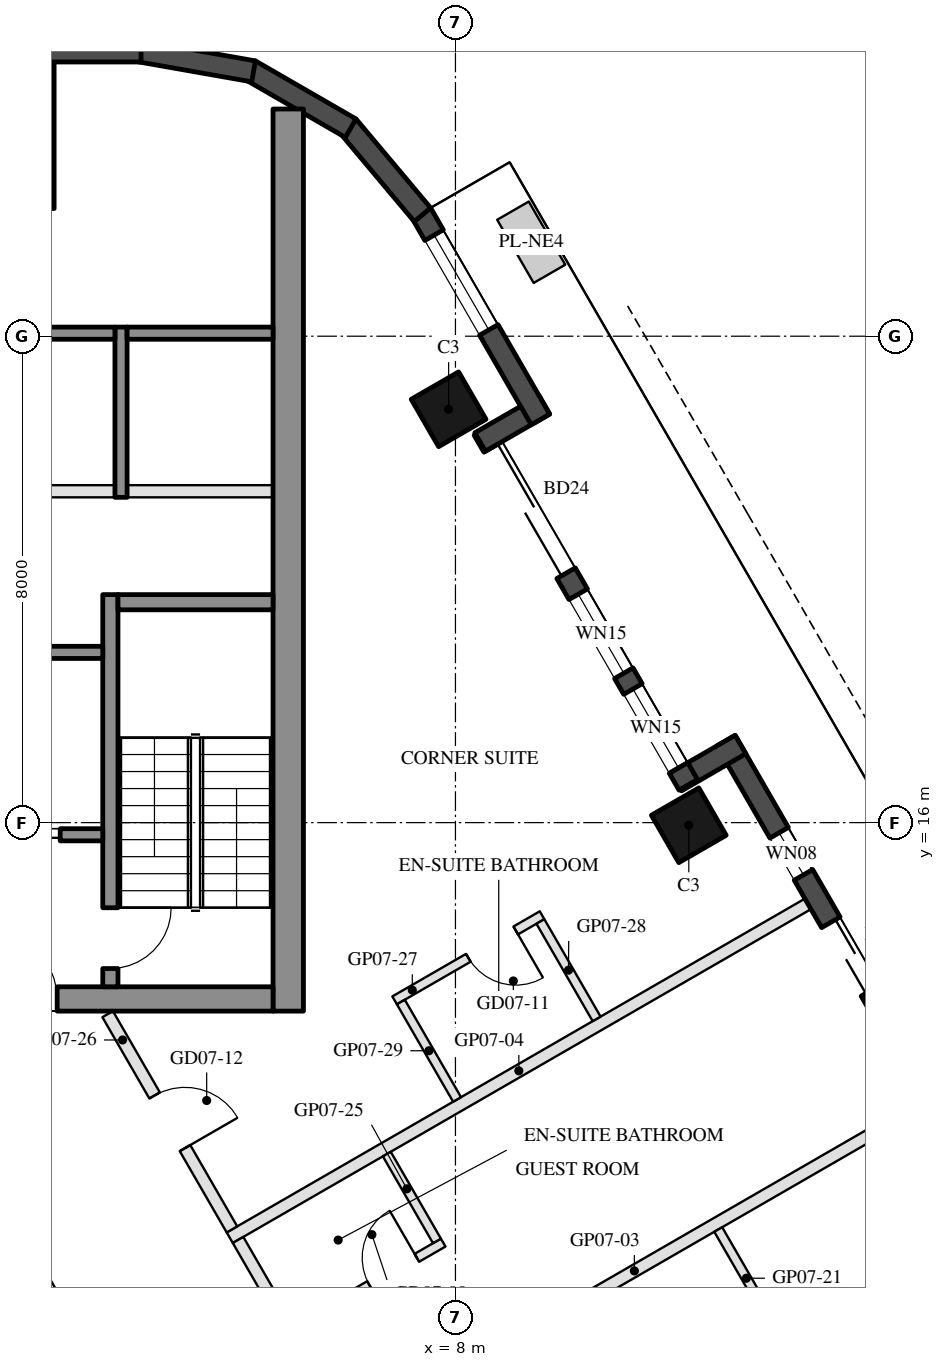
"""IFC4 building model, lengths in metres.
Left out: names, types, materials, properties, quantities, classifications, styles, units other than length and angle.
Written with IfcOpenShell. Run it as: python <this file> out.ifc"""

import sys

from ifc_helpers import new_model, si_unit, direction, frame, frame_2d, origin, origin_2d, place, context, subcontext, project, spatial, rectangle, hollow_rectangle, extrude, element, fill, save


model = new_model("IFC4")
c1 = context("Model", 3, precision=1e-05, world=origin(), true_north=direction((0.0, 1.0)))
c2 = subcontext(c1, "Body", "Model", "MODEL_VIEW")
j1 = project(units=[si_unit("LENGTHUNIT", "METRE"), si_unit("PLANEANGLEUNIT", "RADIAN")], contexts=[c1])
p1 = place(None, origin())
s1 = spatial("IfcSite", under=j1, at=p1, CompositionType="ELEMENT")
p2 = place(p1, origin())
s2 = spatial("IfcBuilding", under=s1, at=p2, CompositionType="ELEMENT")
p3 = place(p2, frame((0.0, 0.0, 98.3)))
s3 = spatial("IfcBuildingStorey", under=s2, at=p3, CompositionType="ELEMENT", Elevation=98.3)
for number, where, z_axis, x_axis in (
    (1, (11.838, 15.957, 0.0), (0.0, 0.0, 1.0), (-0.5, 0.866, 0.0)),
    (2, (7.888, 22.798, 0.0), (0.0, 0.0, 1.0), (-0.5, 0.866, 0.0)),
):
    element("IfcColumn", number, at=place(p3, frame(where, z_axis=z_axis, x_axis=x_axis)), inside=s3, PredefinedType="COLUMN", context=c2, shape_type="SweptSolid", body=[
        extrude(hollow_rectangle(XDim=0.9, YDim=0.9, WallThickness=0.04, at=origin_2d()), origin(), (0.0, 0.0, 1.0), 3.7),
    ])
p4 = place(p3, frame((0.0, 27.3, 0.0), z_axis=(0.0, 0.0, 1.0), x_axis=(1.0, 0.0, 0.0)))
e3 = element("IfcColumn", 3, at=p4, inside=s3, PredefinedType="COLUMN", context=c2, shape_type="SweptSolid", body=[
    extrude(hollow_rectangle(XDim=2.8, YDim=2.4, WallThickness=0.07, at=origin_2d()), origin(), (0.0, 0.0, 1.0), 3.7),
])
p5 = place(p3, frame((17.299, 8.948, 0.0), z_axis=(0.0, 0.0, 1.0), x_axis=(-0.500010041276, 0.866019606374, 0.0)))
e4 = element("IfcWall", 4, at=p5, inside=s3, PredefinedType="SOLIDWALL", context=c2, shape_type="SweptSolid", body=[
    extrude(rectangle(XDim=9.7, YDim=0.35, at=frame_2d((4.85, 0.0))), origin(), (0.0, 0.0, 1.0), 3.55),
])
p6 = place(p5, frame((3.351, 0.0, 0.3)))
e5 = element("IfcOpeningElement", 5, at=p6, cuts=e4, PredefinedType="OPENING", context=c2, shape_type="SweptSolid", body=[
    extrude(rectangle(XDim=0.8, YDim=2.65, at=frame_2d((0.4, 1.325))), frame((0.0, 0.185, 0.0), z_axis=(0.0, -1.0, 0.0), x_axis=(1.0, 0.0, 0.0)), (0.0, 0.0, 1.0), 0.37),
])
p7 = place(p5, frame((4.95, 0.0, 0.0)))
e6 = element("IfcOpeningElement", 6, at=p7, cuts=e4, PredefinedType="OPENING", context=c2, shape_type="SweptSolid", body=[
    extrude(rectangle(XDim=1.3, YDim=2.4, at=frame_2d((0.65, 1.2))), frame((0.0, 0.185, 0.0), z_axis=(0.0, -1.0, 0.0), x_axis=(1.0, 0.0, 0.0)), (0.0, 0.0, 1.0), 0.37),
])
p8 = place(p5, frame((7.15, 0.0, 0.3)))
e7 = element("IfcOpeningElement", 7, at=p8, cuts=e4, PredefinedType="OPENING", context=c2, shape_type="SweptSolid", body=[
    extrude(rectangle(XDim=0.8, YDim=2.65, at=frame_2d((0.4, 1.325))), frame((0.0, 0.185, 0.0), z_axis=(0.0, -1.0, 0.0), x_axis=(1.0, 0.0, 0.0)), (0.0, 0.0, 1.0), 0.37),
])
p9 = place(p3, frame((12.688, 17.284, 0.0), z_axis=(0.0, 0.0, 1.0), x_axis=(-0.865955602162, -0.500120880472, 0.0)))
e8 = element("IfcWall", 8, at=p9, inside=s3, PredefinedType="SOLIDWALL", context=c2, shape_type="SweptSolid", body=[
    extrude(rectangle(XDim=1.22, YDim=0.35, at=frame_2d((0.61, 0.0))), origin(), (0.0, 0.0, 1.0), 3.55),
])
p10 = place(p3, frame((11.829, 16.621, 0.0), z_axis=(0.0, 0.0, 1.0), x_axis=(-0.500003597184, 0.866023326939, 0.0)))
e9 = element("IfcWall", 9, at=p10, inside=s3, PredefinedType="SOLIDWALL", context=c2, shape_type="SweptSolid", body=[
    extrude(rectangle(XDim=6.74, YDim=0.35, at=frame_2d((3.37, 0.0))), origin(), (0.0, 0.0, 1.0), 3.55),
])
p11 = place(p10, frame((4.02, 0.0, 0.0)))
e10 = element("IfcOpeningElement", 10, at=p11, cuts=e9, PredefinedType="OPENING", context=c2, shape_type="SweptSolid", body=[
    extrude(rectangle(XDim=2.4, YDim=2.4, at=frame_2d((1.2, 1.2))), frame((0.0, 0.185, 0.0), z_axis=(0.0, -1.0, 0.0), x_axis=(1.0, 0.0, 0.0)), (0.0, 0.0, 1.0), 0.37),
])
p12 = place(p10, frame((0.32, 0.0, 0.3)))
e11 = element("IfcOpeningElement", 11, at=p12, cuts=e9, PredefinedType="OPENING", context=c2, shape_type="SweptSolid", body=[
    extrude(rectangle(XDim=1.5, YDim=2.65, at=frame_2d((0.75, 1.325))), frame((0.0, 0.185, 0.0), z_axis=(0.0, -1.0, 0.0), x_axis=(1.0, 0.0, 0.0)), (0.0, 0.0, 1.0), 0.37),
])
p13 = place(p10, frame((2.12, 0.0, 0.3)))
e12 = element("IfcOpeningElement", 12, at=p13, cuts=e9, PredefinedType="OPENING", context=c2, shape_type="SweptSolid", body=[
    extrude(rectangle(XDim=1.5, YDim=2.65, at=frame_2d((0.75, 1.325))), frame((0.0, 0.185, 0.0), z_axis=(0.0, -1.0, 0.0), x_axis=(1.0, 0.0, 0.0)), (0.0, 0.0, 1.0), 0.37),
])
p14 = place(p3, frame((8.406, 22.26, 0.0), z_axis=(0.0, 0.0, 1.0), x_axis=(0.865955602162, 0.500120880472, 0.0)))
e13 = element("IfcWall", 13, at=p14, inside=s3, PredefinedType="SOLIDWALL", context=c2, shape_type="SweptSolid", body=[
    extrude(rectangle(XDim=1.22, YDim=0.35, at=frame_2d((0.61, 0.0))), origin(), (0.0, 0.0, 1.0), 3.55),
])
p15 = place(p3, frame((9.398, 22.631, 0.0), z_axis=(0.0, 0.0, 1.0), x_axis=(-0.499954521343, 0.866051659307, 0.0)))
e14 = element("IfcWall", 14, at=p15, inside=s3, PredefinedType="SOLIDWALL", context=c2, shape_type="SweptSolid", body=[
    extrude(rectangle(XDim=3.916, YDim=0.35, at=frame_2d((1.958, 0.0))), origin(), (0.0, 0.0, 1.0), 3.55),
])
p16 = place(p15, frame((1.7, 0.0, 0.3)))
e15 = element("IfcOpeningElement", 15, at=p16, cuts=e14, PredefinedType="OPENING", context=c2, shape_type="SweptSolid", body=[
    extrude(rectangle(XDim=1.8, YDim=2.65, at=frame_2d((0.9, 1.325))), frame((0.0, 0.185, 0.0), z_axis=(0.0, -1.0, 0.0), x_axis=(1.0, 0.0, 0.0)), (0.0, 0.0, 1.0), 0.37),
])
p17 = place(p3, frame((7.458, 25.998, 0.0), z_axis=(0.0, 0.0, 1.0), x_axis=(-0.642808304945, 0.766027077259, 0.0)))
e16 = element("IfcWall", 16, at=p17, inside=s3, PredefinedType="SOLIDWALL", context=c2, shape_type="SweptSolid", body=[
    extrude(rectangle(XDim=1.91, YDim=0.35, at=frame_2d((0.955, 0.0))), origin(), (0.0, 0.0, 1.0), 3.55),
])
for number, where, z_axis, x_axis in (
    (17, (6.277, 27.422, 0.0), (0.0, 0.0, 1.0), (-0.866, 0.5, 0.0)),
    (18, (4.68, 28.356, 0.0), (0.0, 0.0, 1.0), (-0.985, 0.174, 0.0)),
):
    element("IfcWall", number, at=place(p3, frame(where, z_axis=z_axis, x_axis=x_axis)), inside=s3, PredefinedType="SOLIDWALL", context=c2, shape_type="SweptSolid", body=[
        extrude(rectangle(XDim=1.91, YDim=0.35, at=frame_2d((0.955, 0.0))), origin(), (0.0, 0.0, 1.0), 3.55),
    ])
p18 = place(p3, frame((2.829, 28.685, 0.0), z_axis=(0.0, 0.0, 1.0), x_axis=(-1.0, 0.0, 0.0)))
e19 = element("IfcWall", 19, at=p18, inside=s3, PredefinedType="SOLIDWALL", context=c2, shape_type="SweptSolid", body=[
    extrude(rectangle(XDim=5.658, YDim=0.35, at=frame_2d((2.829, 0.0))), origin(), (0.0, 0.0, 1.0), 3.55),
])
p19 = place(p3, frame((5.25, 12.9, 0.0), z_axis=(0.0, 0.0, 1.0), x_axis=(0.0, 1.0, 0.0)))
e20 = element("IfcWall", 20, at=p19, inside=s3, PredefinedType="SHEAR", context=c2, shape_type="SweptSolid", body=[
    extrude(rectangle(XDim=14.837, YDim=0.5, at=frame_2d((7.418, 0.0))), origin(), (0.0, 0.0, 1.0), 3.5),
])
p20 = place(p3, frame((5.0, 13.1, 0.0), z_axis=(0.0, 0.0, 1.0), x_axis=(-1.0, 0.0, 0.0)))
e21 = element("IfcWall", 21, at=p20, inside=s3, PredefinedType="SHEAR", context=c2, shape_type="SweptSolid", body=[
    extrude(rectangle(XDim=10.0, YDim=0.4, at=frame_2d((5.0, 0.0))), origin(), (0.0, 0.0, 1.0), 3.5),
])
p21 = place(p20, frame((3.55, 0.0, 0.0)))
e22 = element("IfcOpeningElement", 22, at=p21, cuts=e21, PredefinedType="OPENING", context=c2, shape_type="SweptSolid", body=[
    extrude(rectangle(XDim=1.1, YDim=2.1, at=frame_2d((0.55, 1.05))), frame((0.0, 0.21, 0.0), z_axis=(0.0, -1.0, 0.0), x_axis=(1.0, 0.0, 0.0)), (0.0, 0.0, 1.0), 0.42),
])
p22 = place(p20, frame((5.85, 0.0, 0.0)))
e23 = element("IfcOpeningElement", 23, at=p22, cuts=e21, PredefinedType="OPENING", context=c2, shape_type="SweptSolid", body=[
    extrude(rectangle(XDim=1.4, YDim=2.1, at=frame_2d((0.7, 1.05))), frame((0.0, 0.21, 0.0), z_axis=(0.0, -1.0, 0.0), x_axis=(1.0, 0.0, 0.0)), (0.0, 0.0, 1.0), 0.42),
])
p23 = place(p3, frame((2.325, 13.3, 0.0), z_axis=(0.0, 0.0, 1.0), x_axis=(0.0, 1.0, 0.0)))
e24 = element("IfcWall", 24, at=p23, inside=s3, PredefinedType="SHEAR", context=c2, shape_type="SweptSolid", body=[
    extrude(rectangle(XDim=6.45, YDim=0.25, at=frame_2d((3.225, 0.0))), origin(), (0.0, 0.0, 1.0), 3.5),
])
p24 = place(p23, frame((0.3, 0.0, 0.0)))
e25 = element("IfcOpeningElement", 25, at=p24, cuts=e24, PredefinedType="OPENING", context=c2, shape_type="SweptSolid", body=[
    extrude(rectangle(XDim=1.0, YDim=2.1, at=frame_2d((0.5, 1.05))), frame((0.0, 0.135, 0.0), z_axis=(0.0, -1.0, 0.0), x_axis=(1.0, 0.0, 0.0)), (0.0, 0.0, 1.0), 0.27),
])
p25 = place(p3, frame((5.0, 19.625, 0.0), z_axis=(0.0, 0.0, 1.0), x_axis=(-1.0, 0.0, 0.0)))
e26 = element("IfcWall", 26, at=p25, inside=s3, PredefinedType="SHEAR", context=c2, shape_type="SweptSolid", body=[
    extrude(rectangle(XDim=2.55, YDim=0.25, at=frame_2d((1.275, 0.0))), origin(), (0.0, 0.0, 1.0), 3.5),
])
p26 = place(p3, frame((2.2, 18.8, 0.0), z_axis=(0.0, 0.0, 1.0), x_axis=(-1.0, 0.0, 0.0)))
e27 = element("IfcWall", 27, at=p26, inside=s3, PredefinedType="SHEAR", context=c2, shape_type="SweptSolid", body=[
    extrude(rectangle(XDim=2.8, YDim=0.2, at=frame_2d((1.4, 0.0))), origin(), (0.0, 0.0, 1.0), 3.5),
])
p27 = place(p3, frame((2.2, 15.8, 0.0), z_axis=(0.0, 0.0, 1.0), x_axis=(-1.0, 0.0, 0.0)))
e28 = element("IfcWall", 28, at=p27, inside=s3, PredefinedType="SHEAR", context=c2, shape_type="SweptSolid", body=[
    extrude(rectangle(XDim=2.8, YDim=0.2, at=frame_2d((1.4, 0.0))), origin(), (0.0, 0.0, 1.0), 3.5),
])
p28 = place(p27, frame((0.7, 0.0, 0.0)))
e29 = element("IfcOpeningElement", 29, at=p28, cuts=e28, PredefinedType="OPENING", context=c2, shape_type="SweptSolid", body=[
    extrude(rectangle(XDim=1.2, YDim=2.1, at=frame_2d((0.6, 1.05))), frame((0.0, 0.11, 0.0), z_axis=(0.0, -1.0, 0.0), x_axis=(1.0, 0.0, 0.0)), (0.0, 0.0, 1.0), 0.22),
])
p29 = place(p3, frame((2.5, 21.35, 0.0), z_axis=(0.0, 0.0, 1.0), x_axis=(0.0, 1.0, 0.0)))
e30 = element("IfcWall", 30, at=p29, inside=s3, PredefinedType="SHEAR", context=c2, shape_type="SweptSolid", body=[
    extrude(rectangle(XDim=2.8, YDim=0.2, at=frame_2d((1.4, 0.0))), origin(), (0.0, 0.0, 1.0), 3.5),
])
p30 = place(p3, frame((5.0, 24.05, 0.0), z_axis=(0.0, 0.0, 1.0), x_axis=(-1.0, 0.0, 0.0)))
e31 = element("IfcWall", 31, at=p30, inside=s3, PredefinedType="SHEAR", context=c2, shape_type="SweptSolid", body=[
    extrude(rectangle(XDim=2.4, YDim=0.2, at=frame_2d((1.2, 0.0))), origin(), (0.0, 0.0, 1.0), 3.5),
])
p31 = place(p3, frame((2.4, 24.05, 0.0), z_axis=(0.0, 0.0, 1.0), x_axis=(-1.0, 0.0, 0.0)))
e32 = element("IfcWall", 32, at=p31, inside=s3, PredefinedType="SHEAR", context=c2, shape_type="SweptSolid", body=[
    extrude(rectangle(XDim=2.8, YDim=0.2, at=frame_2d((1.4, 0.0))), origin(), (0.0, 0.0, 1.0), 3.5),
])
p32 = place(p3, frame((5.0, 21.45, 0.0), z_axis=(0.0, 0.0, 1.0), x_axis=(-1.0, 0.0, 0.0)))
e33 = element("IfcWall", 33, at=p32, inside=s3, PredefinedType="PARTITIONING", context=c2, shape_type="SweptSolid", body=[
    extrude(rectangle(XDim=2.4, YDim=0.2, at=frame_2d((1.2, 0.0))), origin(), (0.0, 0.0, 1.0), 3.5),
])
p33 = place(p3, frame((2.4, 21.45, 0.0), z_axis=(0.0, 0.0, 1.0), x_axis=(-1.0, 0.0, 0.0)))
e34 = element("IfcWall", 34, at=p33, inside=s3, PredefinedType="PARTITIONING", context=c2, shape_type="SweptSolid", body=[
    extrude(rectangle(XDim=2.8, YDim=0.2, at=frame_2d((1.4, 0.0))), origin(), (0.0, 0.0, 1.0), 3.5),
])
for number, where, z_axis, x_axis in (
    (35, (15.697, 11.372, 0.0), (0.0, 0.0, 1.0), (-0.866, -0.5, 0.0)),
    (36, (13.797, 14.663, 0.0), (0.0, 0.0, 1.0), (-0.866, -0.5, 0.0)),
):
    element("IfcWall", number, at=place(p3, frame(where, z_axis=z_axis, x_axis=x_axis)), inside=s3, PredefinedType="PARTITIONING", context=c2, shape_type="SweptSolid", body=[
        extrude(rectangle(XDim=10.98, YDim=0.2, at=frame_2d((5.49, 0.0))), origin(), (0.0, 0.0, 1.0), 2.96),
    ])
p34 = place(p3, frame((13.247, 7.706, 0.0), z_axis=(0.0, 0.0, 1.0), x_axis=(-0.500042316284, 0.866000971088, 0.0)))
e37 = element("IfcWall", 37, at=p34, inside=s3, PredefinedType="PARTITIONING", context=c2, shape_type="SweptSolid", body=[
    extrude(rectangle(XDim=1.85, YDim=0.15, at=frame_2d((0.925, 0.0))), origin(), (0.0, 0.0, 1.0), 2.95),
])
p35 = place(p3, frame((4.425, 9.136, 0.0), z_axis=(0.0, 0.0, 1.0), x_axis=(0.500041424909, -0.866001485781, 0.0)))
e38 = element("IfcWall", 38, at=p35, inside=s3, PredefinedType="PARTITIONING", context=c2, shape_type="SweptSolid", body=[
    extrude(rectangle(XDim=3.6, YDim=0.2, at=frame_2d((1.8, 0.0))), origin(), (0.0, 0.0, 1.0), 2.95),
])
p36 = place(p35, frame((2.2, 0.0, 0.0)))
e39 = element("IfcOpeningElement", 39, at=p36, cuts=e38, PredefinedType="OPENING", context=c2, shape_type="SweptSolid", body=[
    extrude(rectangle(XDim=1.0, YDim=2.1, at=frame_2d((0.5, 1.05))), frame((0.0, 0.11, 0.0), z_axis=(0.0, -1.0, 0.0), x_axis=(1.0, 0.0, 0.0)), (0.0, 0.0, 1.0), 0.22),
])
p37 = place(p3, frame((5.374, 7.692, 0.0), z_axis=(0.0, 0.0, 1.0), x_axis=(0.865996816683, 0.500049511043, 0.0)))
e40 = element("IfcWall", 40, at=p37, inside=s3, PredefinedType="PARTITIONING", context=c2, shape_type="SweptSolid", body=[
    extrude(rectangle(XDim=2.8, YDim=0.15, at=frame_2d((1.4, 0.0))), origin(), (0.0, 0.0, 1.0), 2.95),
])
p38 = place(p37, frame((1.4, 0.0, 0.0)))
e41 = element("IfcOpeningElement", 41, at=p38, cuts=e40, PredefinedType="OPENING", context=c2, shape_type="SweptSolid", body=[
    extrude(rectangle(XDim=0.9, YDim=2.1, at=frame_2d((0.45, 1.05))), frame((0.0, 0.085, 0.0), z_axis=(0.0, -1.0, 0.0), x_axis=(1.0, 0.0, 0.0)), (0.0, 0.0, 1.0), 0.17),
])
p39 = place(p3, frame((7.696, 9.12, 0.0), z_axis=(0.0, 0.0, 1.0), x_axis=(-0.499974350878, 0.866040211805, 0.0)))
e42 = element("IfcWall", 42, at=p39, inside=s3, PredefinedType="PARTITIONING", context=c2, shape_type="SweptSolid", body=[
    extrude(rectangle(XDim=1.65, YDim=0.15, at=frame_2d((0.825, 0.0))), origin(), (0.0, 0.0, 1.0), 2.95),
])
p40 = place(p3, frame((2.281, 12.85, 0.0), z_axis=(0.0, 0.0, 1.0), x_axis=(0.500011931275, -0.86601851515, 0.0)))
e43 = element("IfcWall", 43, at=p40, inside=s3, PredefinedType="PARTITIONING", context=c2, shape_type="SweptSolid", body=[
    extrude(rectangle(XDim=4.088, YDim=0.2, at=frame_2d((2.044, 0.0))), origin(), (0.0, 0.0, 1.0), 2.95),
])
p41 = place(p40, frame((1.544, 0.0, 0.0)))
e44 = element("IfcOpeningElement", 44, at=p41, cuts=e43, PredefinedType="OPENING", context=c2, shape_type="SweptSolid", body=[
    extrude(rectangle(XDim=1.0, YDim=2.1, at=frame_2d((0.5, 1.05))), frame((0.0, 0.11, 0.0), z_axis=(0.0, -1.0, 0.0), x_axis=(1.0, 0.0, 0.0)), (0.0, 0.0, 1.0), 0.22),
])
p42 = place(p3, frame((9.424, 14.477, 0.0), z_axis=(0.0, 0.0, 1.0), x_axis=(-0.866034573852, -0.49998411664, 0.0)))
e45 = element("IfcWall", 45, at=p42, inside=s3, PredefinedType="PARTITIONING", context=c2, shape_type="SweptSolid", body=[
    extrude(rectangle(XDim=2.8, YDim=0.15, at=frame_2d((1.4, 0.0))), origin(), (0.0, 0.0, 1.0), 2.95),
])
p43 = place(p42, frame((0.5, 0.0, 0.0)))
e46 = element("IfcOpeningElement", 46, at=p43, cuts=e45, PredefinedType="OPENING", context=c2, shape_type="SweptSolid", body=[
    extrude(rectangle(XDim=0.9, YDim=2.1, at=frame_2d((0.45, 1.05))), frame((0.0, 0.085, 0.0), z_axis=(0.0, -1.0, 0.0), x_axis=(1.0, 0.0, 0.0)), (0.0, 0.0, 1.0), 0.17),
])
for number, where, z_axis, x_axis in (
    (47, (10.322, 12.772, 0.0), (0.0, 0.0, 1.0), (-0.5, 0.866, 0.0)),
    (48, (8.027, 11.447, 0.0), (0.0, 0.0, 1.0), (-0.5, 0.866, 0.0)),
):
    element("IfcWall", number, at=place(p3, frame(where, z_axis=z_axis, x_axis=x_axis)), inside=s3, PredefinedType="PARTITIONING", context=c2, shape_type="SweptSolid", body=[
        extrude(rectangle(XDim=1.85, YDim=0.15, at=frame_2d((0.925, 0.0))), origin(), (0.0, 0.0, 1.0), 3.55),
    ])
p44 = place(p7, frame((1.3, 0.0, 0.0), z_axis=(0.0, 0.0, 1.0), x_axis=(-1.0, 0.0, 0.0)))
e49 = element("IfcDoor", 49, at=p44, inside=s3, OperationType="SLIDING_TO_LEFT", PredefinedType="DOOR", context=c2, shape_type="SweptSolid", body=[
    extrude(rectangle(XDim=1.3, YDim=2.4, at=frame_2d((0.65, 1.2))), frame((0.0, 0.025, 0.0), z_axis=(0.0, -1.0, 0.0), x_axis=(1.0, 0.0, 0.0)), (0.0, 0.0, 1.0), 0.05),
])
fill(e6, e49)
p45 = place(p8, origin())
e50 = element("IfcWindow", 50, at=p45, inside=s3, PartitioningType="SINGLE_PANEL", PredefinedType="WINDOW", context=c2, shape_type="SweptSolid", body=[
    extrude(rectangle(XDim=0.8, YDim=2.65, at=frame_2d((0.4, 1.325))), frame((0.0, 0.03, 0.0), z_axis=(0.0, -1.0, 0.0), x_axis=(1.0, 0.0, 0.0)), (0.0, 0.0, 1.0), 0.06),
])
fill(e7, e50)
p46 = place(p11, frame((2.4, 0.0, 0.0), z_axis=(0.0, 0.0, 1.0), x_axis=(-1.0, 0.0, 0.0)))
e51 = element("IfcDoor", 51, at=p46, inside=s3, OperationType="SLIDING_TO_LEFT", PredefinedType="DOOR", context=c2, shape_type="SweptSolid", body=[
    extrude(rectangle(XDim=2.4, YDim=2.4, at=frame_2d((1.2, 1.2))), frame((0.0, 0.025, 0.0), z_axis=(0.0, -1.0, 0.0), x_axis=(1.0, 0.0, 0.0)), (0.0, 0.0, 1.0), 0.05),
])
fill(e10, e51)
p47 = place(p12, origin())
e52 = element("IfcWindow", 52, at=p47, inside=s3, PartitioningType="SINGLE_PANEL", PredefinedType="WINDOW", context=c2, shape_type="SweptSolid", body=[
    extrude(rectangle(XDim=1.5, YDim=2.65, at=frame_2d((0.75, 1.325))), frame((0.0, 0.03, 0.0), z_axis=(0.0, -1.0, 0.0), x_axis=(1.0, 0.0, 0.0)), (0.0, 0.0, 1.0), 0.06),
])
fill(e11, e52)
p48 = place(p13, origin())
e53 = element("IfcWindow", 53, at=p48, inside=s3, PartitioningType="SINGLE_PANEL", PredefinedType="WINDOW", context=c2, shape_type="SweptSolid", body=[
    extrude(rectangle(XDim=1.5, YDim=2.65, at=frame_2d((0.75, 1.325))), frame((0.0, 0.03, 0.0), z_axis=(0.0, -1.0, 0.0), x_axis=(1.0, 0.0, 0.0)), (0.0, 0.0, 1.0), 0.06),
])
fill(e12, e53)
p49 = place(p16, origin())
e54 = element("IfcWindow", 54, at=p49, inside=s3, PartitioningType="SINGLE_PANEL", PredefinedType="WINDOW", context=c2, shape_type="SweptSolid", body=[
    extrude(rectangle(XDim=1.8, YDim=2.65, at=frame_2d((0.9, 1.325))), frame((0.0, 0.03, 0.0), z_axis=(0.0, -1.0, 0.0), x_axis=(1.0, 0.0, 0.0)), (0.0, 0.0, 1.0), 0.06),
])
fill(e15, e54)
p50 = place(p28, origin())
e55 = element("IfcDoor", 55, at=p50, inside=s3, OperationType="DOUBLE_DOOR_SLIDING", PredefinedType="DOOR", context=c2, shape_type="SweptSolid", body=[
    extrude(rectangle(XDim=1.2, YDim=2.1, at=frame_2d((0.6, 1.05))), frame((0.0, 0.025, 0.0), z_axis=(0.0, -1.0, 0.0), x_axis=(1.0, 0.0, 0.0)), (0.0, 0.0, 1.0), 0.05),
])
fill(e29, e55)
p51 = place(p21, frame((1.1, 0.0, 0.0), z_axis=(0.0, 0.0, 1.0), x_axis=(-1.0, 0.0, 0.0)))
e56 = element("IfcDoor", 56, at=p51, inside=s3, OperationType="SINGLE_SWING_LEFT", PredefinedType="DOOR", context=c2, shape_type="SweptSolid", body=[
    extrude(rectangle(XDim=1.1, YDim=2.1, at=frame_2d((0.55, 1.05))), frame((0.0, 0.025, 0.0), z_axis=(0.0, -1.0, 0.0), x_axis=(1.0, 0.0, 0.0)), (0.0, 0.0, 1.0), 0.05),
])
fill(e22, e56)
p52 = place(p24, frame((1.0, 0.0, 0.0), z_axis=(0.0, 0.0, 1.0), x_axis=(-1.0, 0.0, 0.0)))
e57 = element("IfcDoor", 57, at=p52, inside=s3, OperationType="SINGLE_SWING_LEFT", PredefinedType="DOOR", context=c2, shape_type="SweptSolid", body=[
    extrude(rectangle(XDim=1.0, YDim=2.1, at=frame_2d((0.5, 1.05))), frame((0.0, 0.025, 0.0), z_axis=(0.0, -1.0, 0.0), x_axis=(1.0, 0.0, 0.0)), (0.0, 0.0, 1.0), 0.05),
])
fill(e25, e57)
p53 = place(p38, origin())
e58 = element("IfcDoor", 58, at=p53, inside=s3, OperationType="SINGLE_SWING_RIGHT", PredefinedType="DOOR", context=c2, shape_type="SweptSolid", body=[
    extrude(rectangle(XDim=0.9, YDim=2.1, at=frame_2d((0.45, 1.05))), frame((0.0, 0.025, 0.0), z_axis=(0.0, -1.0, 0.0), x_axis=(1.0, 0.0, 0.0)), (0.0, 0.0, 1.0), 0.05),
])
fill(e41, e58)
p54 = place(p43, origin())
e59 = element("IfcDoor", 59, at=p54, inside=s3, OperationType="SINGLE_SWING_LEFT", PredefinedType="DOOR", context=c2, shape_type="SweptSolid", body=[
    extrude(rectangle(XDim=0.9, YDim=2.1, at=frame_2d((0.45, 1.05))), frame((0.0, 0.025, 0.0), z_axis=(0.0, -1.0, 0.0), x_axis=(1.0, 0.0, 0.0)), (0.0, 0.0, 1.0), 0.05),
])
fill(e46, e59)
p55 = place(p41, origin())
e60 = element("IfcDoor", 60, at=p55, inside=s3, OperationType="SINGLE_SWING_RIGHT", PredefinedType="DOOR", context=c2, shape_type="SweptSolid", body=[
    extrude(rectangle(XDim=1.0, YDim=2.1, at=frame_2d((0.5, 1.05))), frame((0.0, 0.025, 0.0), z_axis=(0.0, -1.0, 0.0), x_axis=(1.0, 0.0, 0.0)), (0.0, 0.0, 1.0), 0.05),
])
fill(e44, e60)
save(model, sys.argv[1])
